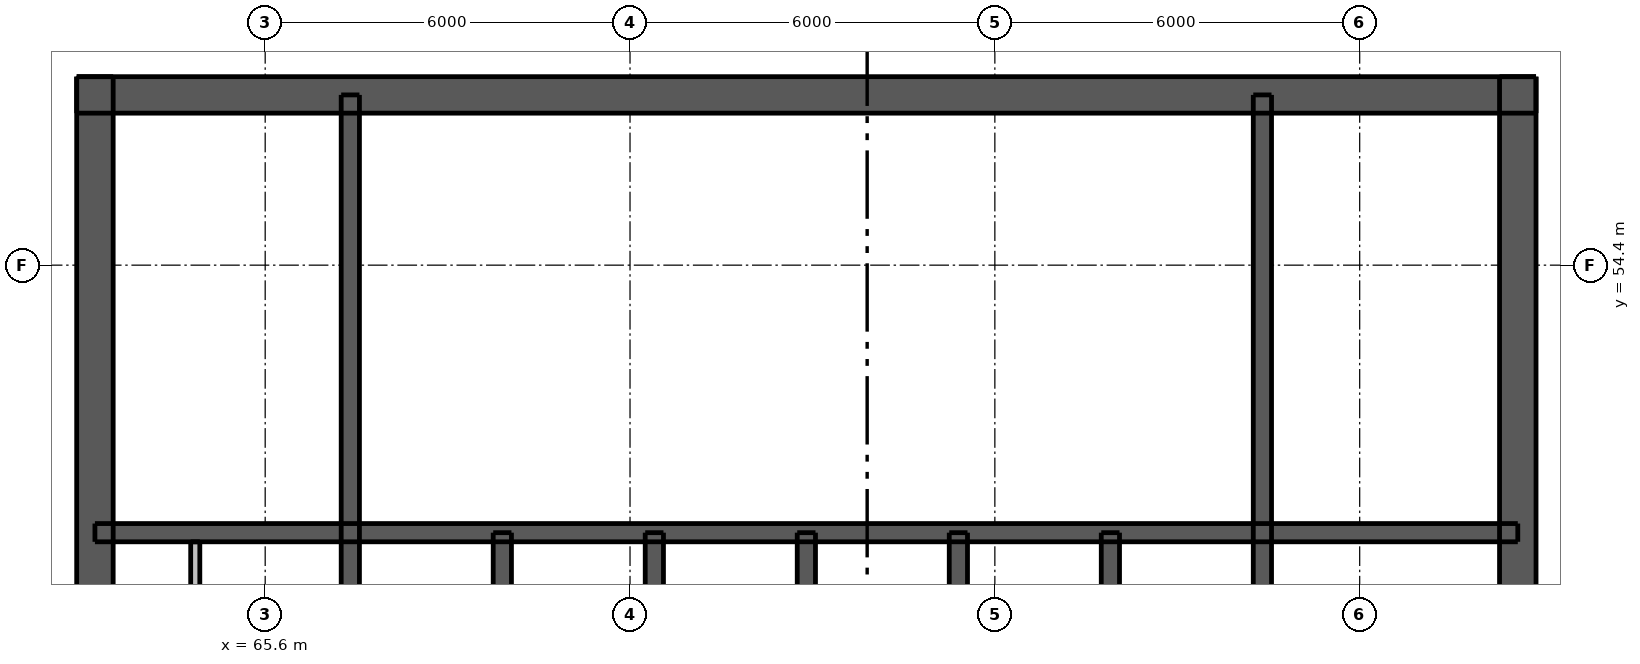
"""IFC4 building model, lengths in metres.
Left out: names, types, materials, properties, quantities, classifications, styles, units other than length and angle.
Written with IfcOpenShell. Run it as: python <this file> out.ifc"""

import sys

from ifc_helpers import new_model, si_unit, direction, frame, frame_2d, origin, place, context, subcontext, project, spatial, rectangle, extrude, element, fill, save


model = new_model("IFC4")
c1 = context("Model", 3, precision=1e-05, world=origin(), true_north=direction((0.0, 1.0)))
c2 = subcontext(c1, "Body", "Model", "MODEL_VIEW")
j1 = project(units=[si_unit("LENGTHUNIT", "METRE"), si_unit("PLANEANGLEUNIT", "RADIAN")], contexts=[c1])
p1 = place(None, origin())
s1 = spatial("IfcSite", under=j1, at=p1, CompositionType="ELEMENT")
p2 = place(p1, origin())
s2 = spatial("IfcBuilding", under=s1, at=p2, CompositionType="ELEMENT")
p3 = place(p2, frame((0.0, 0.0, 193.6)))
s3 = spatial("IfcBuildingStorey", under=s2, at=p3, CompositionType="ELEMENT", Elevation=193.6)
p4 = place(p3, frame((62.5, 57.2, 0.0), z_axis=(0.0, 0.0, 1.0), x_axis=(1.0, 0.0, 0.0)))
e1 = element("IfcWall", 1, at=p4, inside=s3, PredefinedType="SHEAR", context=c2, shape_type="SweptSolid", body=[
    extrude(rectangle(XDim=24.0, YDim=0.6, at=frame_2d((12.0, 0.0))), origin(), (0.0, 0.0, 1.0), 3.05),
])
p5 = place(p4, frame((20.975, 0.0, 0.0)))
e2 = element("IfcOpeningElement", 2, at=p5, cuts=e1, PredefinedType="OPENING", context=c2, shape_type="SweptSolid", body=[
    extrude(rectangle(XDim=1.1, YDim=2.1, at=frame_2d((0.55, 1.05))), frame((0.0, 0.31, 0.0), z_axis=(0.0, -1.0, 0.0), x_axis=(1.0, 0.0, 0.0)), (0.0, 0.0, 1.0), 0.62),
])
p6 = place(p4, frame((1.925, 0.0, 0.0)))
e3 = element("IfcOpeningElement", 3, at=p6, cuts=e1, PredefinedType="OPENING", context=c2, shape_type="SweptSolid", body=[
    extrude(rectangle(XDim=1.1, YDim=2.1, at=frame_2d((0.55, 1.05))), frame((0.0, 0.31, 0.0), z_axis=(0.0, -1.0, 0.0), x_axis=(1.0, 0.0, 0.0)), (0.0, 0.0, 1.0), 0.62),
])
p7 = place(p4, frame((11.55, 0.0, 0.0)))
e4 = element("IfcOpeningElement", 4, at=p7, cuts=e1, PredefinedType="OPENING", context=c2, shape_type="SweptSolid", body=[
    extrude(rectangle(XDim=0.9, YDim=2.1, at=frame_2d((0.45, 1.05))), frame((0.0, 0.31, 0.0), z_axis=(0.0, -1.0, 0.0), x_axis=(1.0, 0.0, 0.0)), (0.0, 0.0, 1.0), 0.62),
])
p8 = place(p3, frame((62.8, 33.5, 0.0), z_axis=(0.0, 0.0, 1.0), x_axis=(0.0, 1.0, 0.0)))
e5 = element("IfcWall", 5, at=p8, inside=s3, PredefinedType="SHEAR", context=c2, shape_type="SweptSolid", body=[
    extrude(rectangle(XDim=24.0, YDim=0.6, at=frame_2d((12.0, 0.0))), origin(), (0.0, 0.0, 1.0), 3.05),
])
p9 = place(p8, frame((11.2, 0.0, 0.0)))
e6 = element("IfcOpeningElement", 6, at=p9, cuts=e5, PredefinedType="OPENING", context=c2, shape_type="SweptSolid", body=[
    extrude(rectangle(XDim=1.6, YDim=2.1, at=frame_2d((0.8, 1.05))), frame((0.0, 0.31, 0.0), z_axis=(0.0, -1.0, 0.0), x_axis=(1.0, 0.0, 0.0)), (0.0, 0.0, 1.0), 0.62),
])
p10 = place(p3, frame((86.2, 33.5, 0.0), z_axis=(0.0, 0.0, 1.0), x_axis=(0.0, 1.0, 0.0)))
e7 = element("IfcWall", 7, at=p10, inside=s3, PredefinedType="SHEAR", context=c2, shape_type="SweptSolid", body=[
    extrude(rectangle(XDim=24.0, YDim=0.6, at=frame_2d((12.0, 0.0))), origin(), (0.0, 0.0, 1.0), 3.05),
])
p11 = place(p10, frame((11.2, 0.0, 0.0)))
e8 = element("IfcOpeningElement", 8, at=p11, cuts=e7, PredefinedType="OPENING", context=c2, shape_type="SweptSolid", body=[
    extrude(rectangle(XDim=1.6, YDim=2.1, at=frame_2d((0.8, 1.05))), frame((0.0, 0.31, 0.0), z_axis=(0.0, -1.0, 0.0), x_axis=(1.0, 0.0, 0.0)), (0.0, 0.0, 1.0), 0.62),
])
p12 = place(p3, frame((62.8, 50.0, 0.0), z_axis=(0.0, 0.0, 1.0), x_axis=(1.0, 0.0, 0.0)))
e9 = element("IfcWall", 9, at=p12, inside=s3, PredefinedType="SHEAR", context=c2, shape_type="SweptSolid", body=[
    extrude(rectangle(XDim=23.4, YDim=0.3, at=frame_2d((11.7, 0.0))), origin(), (0.0, 0.0, 1.0), 3.05),
])
for number, where, z_axis, x_axis in (
    (10, (67.0, 47.1, 0.0), (0.0, 0.0, 1.0), (0.0, 1.0, 0.0)),
    (11, (82.0, 47.1, 0.0), (0.0, 0.0, 1.0), (0.0, 1.0, 0.0)),
):
    element("IfcWall", number, at=place(p3, frame(where, z_axis=z_axis, x_axis=x_axis)), inside=s3, PredefinedType="SHEAR", context=c2, shape_type="SweptSolid", body=[
        extrude(rectangle(XDim=10.1, YDim=0.3, at=frame_2d((5.05, 0.0))), origin(), (0.0, 0.0, 1.0), 3.05),
    ])
for number, where, z_axis, x_axis in (
    (12, (69.5, 47.1, 0.0), (0.0, 0.0, 1.0), (0.0, 1.0, 0.0)),
    (13, (72.0, 47.1, 0.0), (0.0, 0.0, 1.0), (0.0, 1.0, 0.0)),
    (14, (74.5, 47.1, 0.0), (0.0, 0.0, 1.0), (0.0, 1.0, 0.0)),
    (15, (77.0, 47.1, 0.0), (0.0, 0.0, 1.0), (0.0, 1.0, 0.0)),
    (16, (79.5, 47.1, 0.0), (0.0, 0.0, 1.0), (0.0, 1.0, 0.0)),
):
    element("IfcWall", number, at=place(p3, frame(where, z_axis=z_axis, x_axis=x_axis)), inside=s3, PredefinedType="SHEAR", context=c2, shape_type="SweptSolid", body=[
        extrude(rectangle(XDim=2.9, YDim=0.3, at=frame_2d((1.45, 0.0))), origin(), (0.0, 0.0, 1.0), 3.05),
    ])
p13 = place(p3, frame((64.45, 47.25, 0.0), z_axis=(0.0, 0.0, 1.0), x_axis=(0.0, 1.0, 0.0)))
e17 = element("IfcWall", 17, at=p13, inside=s3, PredefinedType="PLUMBINGWALL", context=c2, shape_type="SweptSolid", body=[
    extrude(rectangle(XDim=2.6, YDim=0.15, at=frame_2d((1.3, 0.0))), origin(), (0.0, 0.0, 1.0), 3.05),
])
p14 = place(p5, origin())
e18 = element("IfcDoor", 18, at=p14, inside=s3, OperationType="SINGLE_SWING_RIGHT", PredefinedType="DOOR", context=c2, shape_type="SweptSolid", body=[
    extrude(rectangle(XDim=1.1, YDim=2.1, at=frame_2d((0.55, 1.05))), frame((0.0, -0.237, 0.0), z_axis=(0.0, -1.0, 0.0), x_axis=(1.0, 0.0, 0.0)), (0.0, 0.0, 1.0), 0.05),
])
fill(e2, e18)
p15 = place(p6, origin())
e19 = element("IfcDoor", 19, at=p15, inside=s3, OperationType="SINGLE_SWING_LEFT", PredefinedType="DOOR", context=c2, shape_type="SweptSolid", body=[
    extrude(rectangle(XDim=1.1, YDim=2.1, at=frame_2d((0.55, 1.05))), frame((0.0, -0.237, 0.0), z_axis=(0.0, -1.0, 0.0), x_axis=(1.0, 0.0, 0.0)), (0.0, 0.0, 1.0), 0.05),
])
fill(e3, e19)
p16 = place(p7, origin())
e20 = element("IfcDoor", 20, at=p16, inside=s3, OperationType="SINGLE_SWING_RIGHT", PredefinedType="DOOR", context=c2, shape_type="SweptSolid", body=[
    extrude(rectangle(XDim=0.9, YDim=2.1, at=frame_2d((0.45, 1.05))), frame((0.0, -0.237, 0.0), z_axis=(0.0, -1.0, 0.0), x_axis=(1.0, 0.0, 0.0)), (0.0, 0.0, 1.0), 0.05),
])
fill(e4, e20)
save(model, sys.argv[1])
